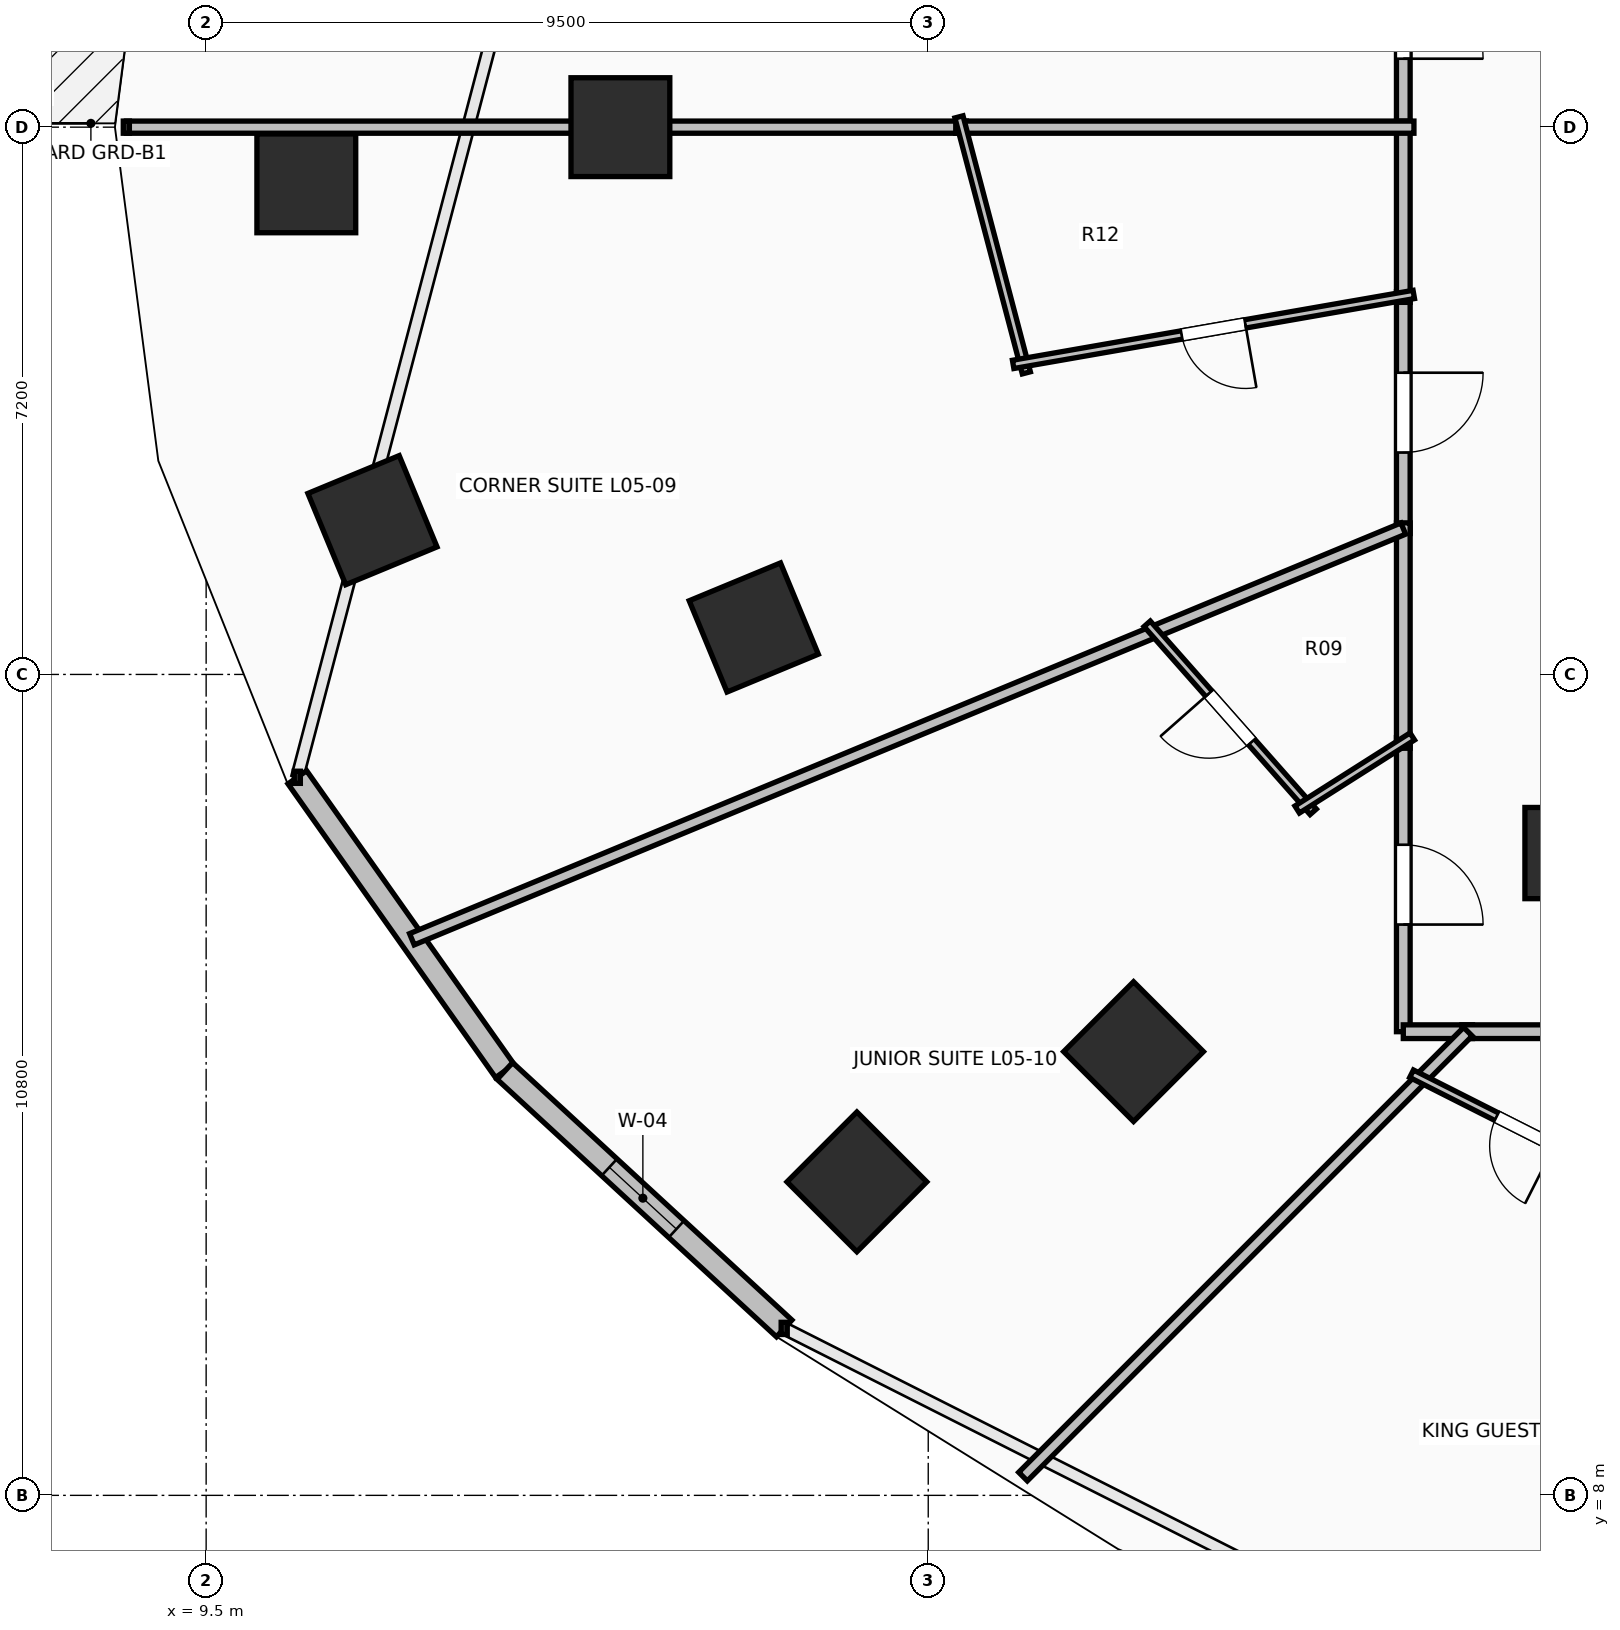
"""IFC4 building model, lengths in metres.
Left out: names, types, materials, properties, quantities, classifications, styles, units other than length and angle.
Written with IfcOpenShell. Run it as: python <this file> out.ifc"""

import sys

from ifc_helpers import new_model, si_unit, direction, frame, frame_2d, origin, origin_2d, place, context, subcontext, project, spatial, rectangle, extrude, element, fill, save


model = new_model("IFC4")
c1 = context("Model", 3, precision=1e-05, world=origin(), true_north=direction((0.0, 1.0)))
c2 = subcontext(c1, "Body", "Model", "MODEL_VIEW")
j1 = project(units=[si_unit("LENGTHUNIT", "METRE"), si_unit("PLANEANGLEUNIT", "RADIAN")], contexts=[c1])
p1 = place(None, origin())
s1 = spatial("IfcSite", under=j1, at=p1, CompositionType="ELEMENT")
p2 = place(p1, origin())
s2 = spatial("IfcBuilding", under=s1, at=p2, CompositionType="ELEMENT")
p3 = place(p2, frame((0.0, 0.0, 24.0)))
s3 = spatial("IfcBuildingStorey", under=s2, at=p3, CompositionType="ELEMENT", Elevation=24.0)
for number, where, z_axis, x_axis in (
    (1, (14.95, 26.0, 0.0), (0.0, 0.0, 1.0), (-1.0, 0.0, 0.0)),
    (2, (16.705, 19.418, 0.0), (0.0, 0.0, 1.0), (-0.924, -0.383, 0.0)),
    (3, (21.701, 13.838, 0.0), (0.0, 0.0, 1.0), (-0.707, -0.707, 0.0)),
    (4, (10.818, 25.261, 0.0), (0.0, 0.0, 1.0), (-1.0, 0.0, 0.0)),
    (5, (11.688, 20.83, 0.0), (0.0, 0.0, 1.0), (-0.924, -0.383, 0.0)),
    (6, (18.061, 12.124, 0.0), (0.0, 0.0, 1.0), (-0.707, -0.707, 0.0)),
):
    element("IfcColumn", number, at=place(p3, frame(where, z_axis=z_axis, x_axis=x_axis)), inside=s3, PredefinedType="COLUMN", context=c2, shape_type="SweptSolid", body=[
        extrude(rectangle(XDim=1.3, YDim=1.3, at=origin_2d()), origin(), (0.0, 0.0, 1.0), 3.5),
    ])
p4 = place(p3, frame((27.25, 16.45, 0.0), z_axis=(0.0, 0.0, 1.0), x_axis=(1.0, 0.0, 0.0)))
e7 = element("IfcColumn", 7, at=p4, inside=s3, PredefinedType="PILASTER", context=c2, shape_type="SweptSolid", body=[
    extrude(rectangle(XDim=0.8, YDim=1.2, at=origin_2d()), origin(), (0.0, 0.0, 1.0), 3.5),
])
p5 = place(p3, frame((10.699, 17.447, 0.0), z_axis=(0.0, 0.0, 1.0), x_axis=(0.577130815624, -0.816651713803, 0.0)))
e8 = element("IfcWall", 8, at=p5, inside=s3, PredefinedType="STANDARD", context=c2, shape_type="SweptSolid", body=[
    extrude(rectangle(XDim=4.731, YDim=0.3, at=frame_2d((2.366, 0.0))), origin(), (0.0, 0.0, 1.0), 3.24),
])
p6 = place(p3, frame((13.43, 13.583, 0.0), z_axis=(0.0, 0.0, 1.0), x_axis=(0.735342629635, -0.677695519419, 0.0)))
e9 = element("IfcWall", 9, at=p6, inside=s3, PredefinedType="STANDARD", context=c2, shape_type="SweptSolid", body=[
    extrude(rectangle(XDim=4.997, YDim=0.3, at=frame_2d((2.499, 0.0))), origin(), (0.0, 0.0, 1.0), 3.24),
])
p7 = place(p6, frame((1.869, 0.0, 0.85)))
e10 = element("IfcOpeningElement", 10, at=p7, cuts=e9, PredefinedType="OPENING", context=c2, shape_type="SweptSolid", body=[
    extrude(rectangle(XDim=1.2, YDim=1.95, at=frame_2d((0.6, 0.975))), frame((0.0, 0.165, 0.0), z_axis=(0.0, -1.0, 0.0), x_axis=(1.0, 0.0, 0.0)), (0.0, 0.0, 1.0), 0.33),
])
p8 = place(p3, frame((25.25, 28.911, 0.0), z_axis=(0.0, 0.0, 1.0), x_axis=(0.0, -1.0, 0.0)))
e11 = element("IfcWall", 11, at=p8, inside=s3, PredefinedType="PARTITIONING", context=c2, shape_type="SweptSolid", body=[
    extrude(rectangle(XDim=2.971, YDim=0.18, at=frame_2d((1.485, 0.0))), origin(), (0.0, 0.0, 1.0), 2.432),
])
p9 = place(p8, frame((0.96, 0.0, 0.0)))
e12 = element("IfcOpeningElement", 12, at=p9, cuts=e11, PredefinedType="OPENING", context=c2, shape_type="SweptSolid", body=[
    extrude(rectangle(XDim=1.05, YDim=2.2, at=frame_2d((0.525, 1.1))), frame((0.0, 0.105, 0.0), z_axis=(0.0, -1.0, 0.0), x_axis=(1.0, 0.0, 0.0)), (0.0, 0.0, 1.0), 0.21),
])
p10 = place(p3, frame((25.25, 23.835, 0.0), z_axis=(0.0, 0.0, 1.0), x_axis=(0.0, -1.0, 0.0)))
e13 = element("IfcWall", 13, at=p10, inside=s3, PredefinedType="PARTITIONING", context=c2, shape_type="SweptSolid", body=[
    extrude(rectangle(XDim=3.181, YDim=0.18, at=frame_2d((1.59, 0.0))), origin(), (0.0, 0.0, 1.0), 3.24),
])
p11 = place(p10, frame((1.065, 0.0, 0.0)))
e14 = element("IfcOpeningElement", 14, at=p11, cuts=e13, PredefinedType="OPENING", context=c2, shape_type="SweptSolid", body=[
    extrude(rectangle(XDim=1.05, YDim=2.2, at=frame_2d((0.525, 1.1))), frame((0.0, 0.105, 0.0), z_axis=(0.0, -1.0, 0.0), x_axis=(1.0, 0.0, 0.0)), (0.0, 0.0, 1.0), 0.21),
])
p12 = place(p3, frame((25.25, 26.08, 0.0), z_axis=(0.0, 0.0, 1.0), x_axis=(0.0, -1.0, 0.0)))
e15 = element("IfcWall", 15, at=p12, inside=s3, PredefinedType="PARTITIONING", context=c2, shape_type="SweptSolid", body=[
    extrude(rectangle(XDim=2.385, YDim=0.18, at=frame_2d((1.192, 0.0))), origin(), (0.0, 0.0, 1.0), 3.24),
])
p13 = place(p3, frame((25.25, 17.969, 0.0), z_axis=(0.0, 0.0, 1.0), x_axis=(0.0, -1.0, 0.0)))
e16 = element("IfcWall", 16, at=p13, inside=s3, PredefinedType="PARTITIONING", context=c2, shape_type="SweptSolid", body=[
    extrude(rectangle(XDim=3.869, YDim=0.18, at=frame_2d((1.935, 0.0))), origin(), (0.0, 0.0, 1.0), 2.432),
])
p14 = place(p13, frame((1.409, 0.0, 0.0)))
e17 = element("IfcOpeningElement", 17, at=p14, cuts=e16, PredefinedType="OPENING", context=c2, shape_type="SweptSolid", body=[
    extrude(rectangle(XDim=1.05, YDim=2.2, at=frame_2d((0.525, 1.1))), frame((0.0, 0.105, 0.0), z_axis=(0.0, -1.0, 0.0), x_axis=(1.0, 0.0, 0.0)), (0.0, 0.0, 1.0), 0.21),
])
p15 = place(p3, frame((25.25, 14.1, 0.0), z_axis=(0.0, 0.0, 1.0), x_axis=(1.0, 0.0, 0.0)))
e18 = element("IfcWall", 18, at=p15, inside=s3, PredefinedType="PARTITIONING", context=c2, shape_type="SweptSolid", body=[
    extrude(rectangle(XDim=0.91, YDim=0.18, at=frame_2d((0.455, 0.0))), origin(), (0.0, 0.0, 1.0), 3.24),
])
p16 = place(p3, frame((25.25, 20.794, 0.0), z_axis=(0.0, 0.0, 1.0), x_axis=(0.0, -1.0, 0.0)))
e19 = element("IfcWall", 19, at=p16, inside=s3, PredefinedType="PARTITIONING", context=c2, shape_type="SweptSolid", body=[
    extrude(rectangle(XDim=2.965, YDim=0.18, at=frame_2d((1.482, 0.0))), origin(), (0.0, 0.0, 1.0), 3.24),
])
p17 = place(p3, frame((26.02, 14.1, 0.0), z_axis=(0.0, 0.0, 1.0), x_axis=(1.0, 0.0, 0.0)))
e20 = element("IfcWall", 20, at=p17, inside=s3, PredefinedType="PARTITIONING", context=c2, shape_type="SweptSolid", body=[
    extrude(rectangle(XDim=3.684, YDim=0.18, at=frame_2d((1.842, 0.0))), origin(), (0.0, 0.0, 1.0), 2.432),
])
p18 = place(p3, frame((8.451, 26.0, 0.0), z_axis=(0.0, 0.0, 1.0), x_axis=(1.0, 0.0, 0.0)))
e21 = element("IfcWall", 21, at=p18, inside=s3, PredefinedType="PARTITIONING", context=c2, shape_type="SweptSolid", body=[
    extrude(rectangle(XDim=11.051, YDim=0.16, at=frame_2d((5.525, 0.0))), origin(), (0.0, 0.0, 1.0), 2.432),
])
p19 = place(p3, frame((19.362, 26.0, 0.0), z_axis=(0.0, 0.0, 1.0), x_axis=(1.0, 0.0, 0.0)))
e22 = element("IfcWall", 22, at=p19, inside=s3, PredefinedType="PARTITIONING", context=c2, shape_type="SweptSolid", body=[
    extrude(rectangle(XDim=6.028, YDim=0.16, at=frame_2d((3.014, 0.0))), origin(), (0.0, 0.0, 1.0), 2.922),
])
p20 = place(p3, frame((20.291, 22.768, 0.0), z_axis=(0.0, 0.0, 1.0), x_axis=(-0.254476045764, 0.967079077497, 0.0)))
e23 = element("IfcWall", 23, at=p20, inside=s3, PredefinedType="PARTITIONING", context=c2, shape_type="SweptSolid", body=[
    extrude(rectangle(XDim=3.483, YDim=0.11, at=frame_2d((1.741, 0.0))), origin(), (0.0, 0.0, 1.0), 3.24),
])
p21 = place(p3, frame((25.388, 23.799, 0.0), z_axis=(0.0, 0.0, 1.0), x_axis=(-0.985100697644, -0.171978532096, 0.0)))
e24 = element("IfcWall", 24, at=p21, inside=s3, PredefinedType="PARTITIONING", context=c2, shape_type="SweptSolid", body=[
    extrude(rectangle(XDim=5.351, YDim=0.11, at=frame_2d((2.675, 0.0))), origin(), (0.0, 0.0, 1.0), 2.922),
])
p22 = place(p21, frame((2.25, 0.0, 0.0)))
e25 = element("IfcOpeningElement", 25, at=p22, cuts=e24, PredefinedType="OPENING", context=c2, shape_type="SweptSolid", body=[
    extrude(rectangle(XDim=0.85, YDim=2.1, at=frame_2d((0.425, 1.05))), frame((0.0, 0.07, 0.0), z_axis=(0.0, -1.0, 0.0), x_axis=(1.0, 0.0, 0.0)), (0.0, 0.0, 1.0), 0.14),
])
p23 = place(p3, frame((12.207, 15.316, 0.0), z_axis=(0.0, 0.0, 1.0), x_axis=(0.923866969846, 0.382713759914, 0.0)))
e26 = element("IfcWall", 26, at=p23, inside=s3, PredefinedType="PARTITIONING", context=c2, shape_type="SweptSolid", body=[
    extrude(rectangle(XDim=14.118, YDim=0.16, at=frame_2d((7.059, 0.0))), origin(), (0.0, 0.0, 1.0), 2.432),
])
p24 = place(p3, frame((24.065, 16.993, 0.0), z_axis=(0.0, 0.0, 1.0), x_axis=(-0.662059609276, 0.749451181709, 0.0)))
e27 = element("IfcWall", 27, at=p24, inside=s3, PredefinedType="PARTITIONING", context=c2, shape_type="SweptSolid", body=[
    extrude(rectangle(XDim=3.299, YDim=0.11, at=frame_2d((1.65, 0.0))), origin(), (0.0, 0.0, 1.0), 2.432),
])
p25 = place(p24, frame((1.225, 0.0, 0.0)))
e28 = element("IfcOpeningElement", 28, at=p25, cuts=e27, PredefinedType="OPENING", context=c2, shape_type="SweptSolid", body=[
    extrude(rectangle(XDim=0.85, YDim=2.1, at=frame_2d((0.425, 1.05))), frame((0.0, 0.07, 0.0), z_axis=(0.0, -1.0, 0.0), x_axis=(1.0, 0.0, 0.0)), (0.0, 0.0, 1.0), 0.14),
])
p26 = place(p3, frame((25.368, 17.984, 0.0), z_axis=(0.0, 0.0, 1.0), x_axis=(-0.844361394482, -0.535774052665, 0.0)))
e29 = element("IfcWall", 29, at=p26, inside=s3, PredefinedType="PARTITIONING", context=c2, shape_type="SweptSolid", body=[
    extrude(rectangle(XDim=1.793, YDim=0.11, at=frame_2d((0.897, 0.0))), origin(), (0.0, 0.0, 1.0), 2.432),
])
p27 = place(p3, frame((20.247, 8.247, 0.0), z_axis=(0.0, 0.0, 1.0), x_axis=(0.707106781187, 0.707106781187, 0.0)))
e30 = element("IfcWall", 30, at=p27, inside=s3, PredefinedType="PARTITIONING", context=c2, shape_type="SweptSolid", body=[
    extrude(rectangle(XDim=8.277, YDim=0.16, at=frame_2d((4.139, 0.0))), origin(), (0.0, 0.0, 1.0), 2.624),
])
p28 = place(p3, frame((28.354, 12.034, 0.0), z_axis=(0.0, 0.0, 1.0), x_axis=(-0.892556909034, 0.450934767052, 0.0)))
e31 = element("IfcWall", 31, at=p28, inside=s3, PredefinedType="PARTITIONING", context=c2, shape_type="SweptSolid", body=[
    extrude(rectangle(XDim=3.356, YDim=0.11, at=frame_2d((1.678, 0.0))), origin(), (0.0, 0.0, 1.0), 2.432),
])
p29 = place(p28, frame((1.253, 0.0, 0.0)))
e32 = element("IfcOpeningElement", 32, at=p29, cuts=e31, PredefinedType="OPENING", context=c2, shape_type="SweptSolid", body=[
    extrude(rectangle(XDim=0.85, YDim=2.1, at=frame_2d((0.425, 1.05))), frame((0.0, 0.07, 0.0), z_axis=(0.0, -1.0, 0.0), x_axis=(1.0, 0.0, 0.0)), (0.0, 0.0, 1.0), 0.14),
])
p30 = place(p7, origin())
e33 = element("IfcWindow", 33, at=p30, inside=s3, PartitioningType="SINGLE_PANEL", PredefinedType="WINDOW", context=c2, shape_type="SweptSolid", body=[
    extrude(rectangle(XDim=1.2, YDim=1.95, at=frame_2d((0.6, 0.975))), frame((0.0, 0.03, 0.0), z_axis=(0.0, -1.0, 0.0), x_axis=(1.0, 0.0, 0.0)), (0.0, 0.0, 1.0), 0.06),
])
fill(e10, e33)
p31 = place(p9, origin())
e34 = element("IfcDoor", 34, at=p31, inside=s3, OperationType="SINGLE_SWING_RIGHT", PredefinedType="DOOR", context=c2, shape_type="SweptSolid", body=[
    extrude(rectangle(XDim=1.05, YDim=2.2, at=frame_2d((0.525, 1.1))), frame((0.0, 0.025, 0.0), z_axis=(0.0, -1.0, 0.0), x_axis=(1.0, 0.0, 0.0)), (0.0, 0.0, 1.0), 0.05),
])
fill(e12, e34)
p32 = place(p11, origin())
e35 = element("IfcDoor", 35, at=p32, inside=s3, OperationType="SINGLE_SWING_LEFT", PredefinedType="DOOR", context=c2, shape_type="SweptSolid", body=[
    extrude(rectangle(XDim=1.05, YDim=2.2, at=frame_2d((0.525, 1.1))), frame((0.0, 0.025, 0.0), z_axis=(0.0, -1.0, 0.0), x_axis=(1.0, 0.0, 0.0)), (0.0, 0.0, 1.0), 0.05),
])
fill(e14, e35)
p33 = place(p14, origin())
e36 = element("IfcDoor", 36, at=p33, inside=s3, OperationType="SINGLE_SWING_RIGHT", PredefinedType="DOOR", context=c2, shape_type="SweptSolid", body=[
    extrude(rectangle(XDim=1.05, YDim=2.2, at=frame_2d((0.525, 1.1))), frame((0.0, 0.025, 0.0), z_axis=(0.0, -1.0, 0.0), x_axis=(1.0, 0.0, 0.0)), (0.0, 0.0, 1.0), 0.05),
])
fill(e17, e36)
p34 = place(p22, origin())
e37 = element("IfcDoor", 37, at=p34, inside=s3, OperationType="SINGLE_SWING_LEFT", PredefinedType="DOOR", context=c2, shape_type="SweptSolid", body=[
    extrude(rectangle(XDim=0.85, YDim=2.1, at=frame_2d((0.425, 1.05))), frame((0.0, 0.025, 0.0), z_axis=(0.0, -1.0, 0.0), x_axis=(1.0, 0.0, 0.0)), (0.0, 0.0, 1.0), 0.05),
])
fill(e25, e37)
p35 = place(p25, origin())
e38 = element("IfcDoor", 38, at=p35, inside=s3, OperationType="SINGLE_SWING_RIGHT", PredefinedType="DOOR", context=c2, shape_type="SweptSolid", body=[
    extrude(rectangle(XDim=0.85, YDim=2.1, at=frame_2d((0.425, 1.05))), frame((0.0, 0.025, 0.0), z_axis=(0.0, -1.0, 0.0), x_axis=(1.0, 0.0, 0.0)), (0.0, 0.0, 1.0), 0.05),
])
fill(e28, e38)
p36 = place(p29, origin())
e39 = element("IfcDoor", 39, at=p36, inside=s3, OperationType="SINGLE_SWING_LEFT", PredefinedType="DOOR", context=c2, shape_type="SweptSolid", body=[
    extrude(rectangle(XDim=0.85, YDim=2.1, at=frame_2d((0.425, 1.05))), frame((0.0, 0.025, 0.0), z_axis=(0.0, -1.0, 0.0), x_axis=(1.0, 0.0, 0.0)), (0.0, 0.0, 1.0), 0.05),
])
fill(e32, e39)
save(model, sys.argv[1])
